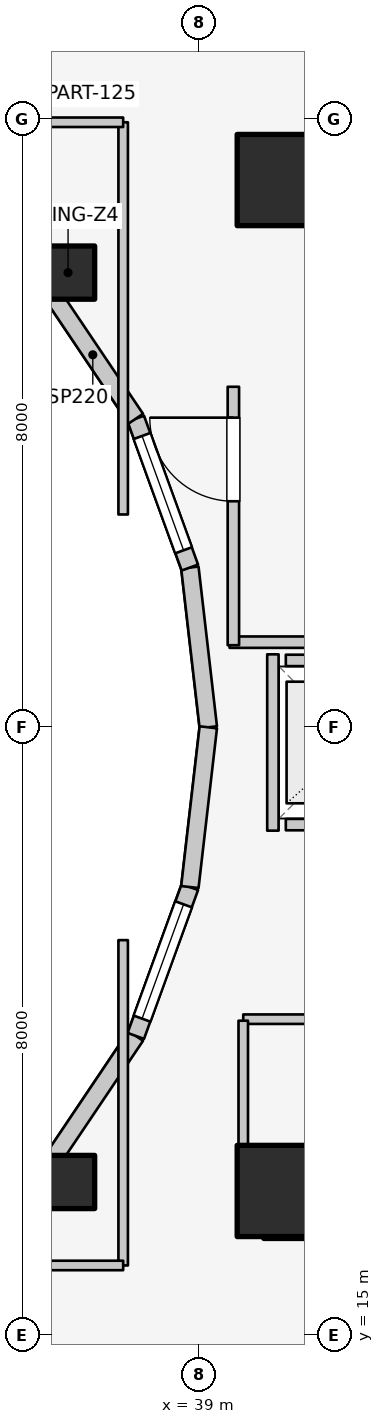
"""IFC4 building model, lengths in metres.
Left out: names, types, materials, properties, quantities, classifications, styles, units other than length and angle.
Written with IfcOpenShell. Run it as: python <this file> out.ifc"""

import sys

from ifc_helpers import new_model, si_unit, direction, frame, frame_2d, origin, origin_2d, place, context, subcontext, project, spatial, rectangle, extrude, element, fill, save


model = new_model("IFC4")
c1 = context("Model", 3, precision=1e-05, world=origin(), true_north=direction((0.0, 1.0)))
c2 = subcontext(c1, "Body", "Model", "MODEL_VIEW")
j1 = project(units=[si_unit("LENGTHUNIT", "METRE"), si_unit("PLANEANGLEUNIT", "RADIAN")], contexts=[c1])
p1 = place(None, origin())
s1 = spatial("IfcSite", under=j1, at=p1, CompositionType="ELEMENT")
p2 = place(p1, origin())
s2 = spatial("IfcBuilding", under=s1, at=p2, CompositionType="ELEMENT")
p3 = place(p2, frame((0.0, 0.0, 204.7)))
s3 = spatial("IfcBuildingStorey", under=s2, at=p3, CompositionType="ELEMENT", Elevation=204.7)
for number, where, z_axis, x_axis in (
    (1, (39.85, 16.55, 0.0), (0.0, 0.0, 1.0), (1.0, 0.0, 0.0)),
    (2, (39.85, 30.35, 0.0), (0.0, 0.0, 1.0), (1.0, 0.0, 0.0)),
):
    element("IfcWall", number, at=place(p3, frame(where, z_axis=z_axis, x_axis=x_axis)), inside=s3, PredefinedType="SHEAR", context=c2, shape_type="SweptSolid", body=[
        extrude(rectangle(XDim=4.5, YDim=0.55, at=frame_2d((2.25, 0.0))), origin(), (0.0, 0.0, 1.0), 3.1),
    ])
for number, where, z_axis, x_axis in (
    (3, (40.1, 16.9, 0.0), (0.0, 0.0, 1.0), (1.0, 0.0, 0.0)),
    (4, (40.1, 30.2, 0.0), (0.0, 0.0, 1.0), (1.0, 0.0, 0.0)),
):
    element("IfcColumn", number, at=place(p3, frame(where, z_axis=z_axis, x_axis=x_axis)), inside=s3, PredefinedType="COLUMN", context=c2, shape_type="SweptSolid", body=[
        extrude(rectangle(XDim=1.2, YDim=1.2, at=origin_2d()), origin(), (0.0, 0.0, 1.0), 3.1),
    ])
for number, where, z_axis, x_axis in (
    (5, (37.275, 28.982, 0.0), (0.0, 0.0, 1.0), (1.0, 0.0, 0.0)),
    (6, (37.275, 17.018, 0.0), (0.0, 0.0, 1.0), (1.0, 0.0, 0.0)),
):
    element("IfcColumn", number, at=place(p3, frame(where, z_axis=z_axis, x_axis=x_axis)), inside=s3, PredefinedType="COLUMN", context=c2, shape_type="SweptSolid", body=[
        extrude(rectangle(XDim=0.7, YDim=0.7, at=origin_2d()), origin(), (0.0, 0.0, 1.0), 3.1),
    ])
p4 = place(p3, frame((39.12, 23.0, 0.0), z_axis=(0.0, 0.0, 1.0), x_axis=(-0.114711713601, 0.993398823617, 0.0)))
e7 = element("IfcWall", 7, at=p4, inside=s3, PredefinedType="STANDARD", context=c2, shape_type="SweptSolid", body=[
    extrude(rectangle(XDim=2.115, YDim=0.23, at=frame_2d((1.058, 0.0))), origin(), (0.0, 0.0, 1.0), 2.84),
])
p5 = place(p3, frame((38.877, 25.102, 0.0), z_axis=(0.0, 0.0, 1.0), x_axis=(-0.341423187295, 0.93990968033, 0.0)))
e8 = element("IfcWall", 8, at=p5, inside=s3, PredefinedType="STANDARD", context=c2, shape_type="SweptSolid", body=[
    extrude(rectangle(XDim=2.084, YDim=0.23, at=frame_2d((1.042, 0.0))), origin(), (0.0, 0.0, 1.0), 2.84),
])
p6 = place(p5, frame((0.242, 0.0, 0.85)))
e9 = element("IfcOpeningElement", 9, at=p6, cuts=e8, PredefinedType="OPENING", context=c2, shape_type="SweptSolid", body=[
    extrude(rectangle(XDim=1.6, YDim=1.65, at=frame_2d((0.8, 0.825))), frame((0.0, 0.125, 0.0), z_axis=(0.0, -1.0, 0.0), x_axis=(1.0, 0.0, 0.0)), (0.0, 0.0, 1.0), 0.25),
])
p7 = place(p3, frame((38.166, 27.06, 0.0), z_axis=(0.0, 0.0, 1.0), x_axis=(-0.558197800898, 0.829707909492, 0.0)))
e10 = element("IfcWall", 10, at=p7, inside=s3, PredefinedType="STANDARD", context=c2, shape_type="SweptSolid", body=[
    extrude(rectangle(XDim=2.027, YDim=0.23, at=frame_2d((1.013, 0.0))), origin(), (0.0, 0.0, 1.0), 2.16),
])
for number, where, z_axis, x_axis in (
    (11, (37.035, 28.742, 0.0), (0.0, 0.0, 1.0), (-0.753, 0.659, 0.0)),
    (12, (35.56, 15.968, 0.0), (0.0, 0.0, 1.0), (0.753, 0.659, 0.0)),
):
    element("IfcWall", number, at=place(p3, frame(where, z_axis=z_axis, x_axis=x_axis)), inside=s3, PredefinedType="STANDARD", context=c2, shape_type="SweptSolid", body=[
        extrude(rectangle(XDim=1.959, YDim=0.23, at=frame_2d((0.98, 0.0))), origin(), (0.0, 0.0, 1.0), 2.16),
    ])
p8 = place(p3, frame((37.035, 17.258, 0.0), z_axis=(0.0, 0.0, 1.0), x_axis=(0.558197800898, 0.829707909492, 0.0)))
e13 = element("IfcWall", 13, at=p8, inside=s3, PredefinedType="STANDARD", context=c2, shape_type="SweptSolid", body=[
    extrude(rectangle(XDim=2.027, YDim=0.23, at=frame_2d((1.013, 0.0))), origin(), (0.0, 0.0, 1.0), 2.16),
])
p9 = place(p3, frame((38.166, 18.94, 0.0), z_axis=(0.0, 0.0, 1.0), x_axis=(0.341423187295, 0.93990968033, 0.0)))
e14 = element("IfcWall", 14, at=p9, inside=s3, PredefinedType="STANDARD", context=c2, shape_type="SweptSolid", body=[
    extrude(rectangle(XDim=2.084, YDim=0.23, at=frame_2d((1.042, 0.0))), origin(), (0.0, 0.0, 1.0), 2.84),
])
p10 = place(p9, frame((0.242, 0.0, 0.85)))
e15 = element("IfcOpeningElement", 15, at=p10, cuts=e14, PredefinedType="OPENING", context=c2, shape_type="SweptSolid", body=[
    extrude(rectangle(XDim=1.6, YDim=1.65, at=frame_2d((0.8, 0.825))), frame((0.0, 0.125, 0.0), z_axis=(0.0, -1.0, 0.0), x_axis=(1.0, 0.0, 0.0)), (0.0, 0.0, 1.0), 0.25),
])
p11 = place(p3, frame((38.877, 20.898, 0.0), z_axis=(0.0, 0.0, 1.0), x_axis=(0.114711713601, 0.993398823617, 0.0)))
e16 = element("IfcWall", 16, at=p11, inside=s3, PredefinedType="STANDARD", context=c2, shape_type="SweptSolid", body=[
    extrude(rectangle(XDim=2.115, YDim=0.23, at=frame_2d((1.058, 0.0))), origin(), (0.0, 0.0, 1.0), 2.84),
])
p12 = place(p3, frame((40.14, 21.72, 0.0), z_axis=(0.0, 0.0, 1.0), x_axis=(1.0, 0.0, 0.0)))
e17 = element("IfcWall", 17, at=p12, inside=s3, PredefinedType="SOLIDWALL", context=c2, shape_type="SweptSolid", body=[
    extrude(rectangle(XDim=1.82, YDim=0.15, at=frame_2d((0.91, 0.0))), origin(), (0.0, 0.0, 1.0), 2.12),
])
p13 = place(p12, frame((0.36, 0.0, 0.0)))
e18 = element("IfcOpeningElement", 18, at=p13, cuts=e17, PredefinedType="OPENING", context=c2, shape_type="SweptSolid", body=[
    extrude(rectangle(XDim=1.1, YDim=2.1, at=frame_2d((0.55, 1.05))), frame((0.0, 0.085, 0.0), z_axis=(0.0, -1.0, 0.0), x_axis=(1.0, 0.0, 0.0)), (0.0, 0.0, 1.0), 0.17),
])
p14 = place(p3, frame((40.14, 23.88, 0.0), z_axis=(0.0, 0.0, 1.0), x_axis=(1.0, 0.0, 0.0)))
e19 = element("IfcWall", 19, at=p14, inside=s3, PredefinedType="SOLIDWALL", context=c2, shape_type="SweptSolid", body=[
    extrude(rectangle(XDim=1.82, YDim=0.15, at=frame_2d((0.91, 0.0))), origin(), (0.0, 0.0, 1.0), 2.12),
])
p15 = place(p3, frame((39.97, 21.64, 0.0), z_axis=(0.0, 0.0, 1.0), x_axis=(0.0, 1.0, 0.0)))
e20 = element("IfcWall", 20, at=p15, inside=s3, PredefinedType="SOLIDWALL", context=c2, shape_type="SweptSolid", body=[
    extrude(rectangle(XDim=2.32, YDim=0.15, at=frame_2d((1.16, 0.0))), origin(), (0.0, 0.0, 1.0), 2.12),
])
p16 = place(p3, frame((39.4, 24.12, 0.0), z_axis=(0.0, 0.0, 1.0), x_axis=(1.0, 0.0, 0.0)))
e21 = element("IfcWall", 21, at=p16, inside=s3, PredefinedType="PARTITIONING", context=c2, shape_type="SweptSolid", body=[
    extrude(rectangle(XDim=5.08, YDim=0.15, at=frame_2d((2.54, 0.0))), origin(), (0.0, 0.0, 1.0), 2.12),
])
p17 = place(p3, frame((39.45, 24.08, 0.0), z_axis=(0.0, 0.0, 1.0), x_axis=(0.0, 1.0, 0.0)))
e22 = element("IfcWall", 22, at=p17, inside=s3, PredefinedType="PARTITIONING", context=c2, shape_type="SweptSolid", body=[
    extrude(rectangle(XDim=3.4, YDim=0.15, at=frame_2d((1.7, 0.0))), origin(), (0.0, 0.0, 1.0), 2.855),
])
p18 = place(p17, frame((1.894, 0.0, 0.0)))
e23 = element("IfcOpeningElement", 23, at=p18, cuts=e22, PredefinedType="OPENING", context=c2, shape_type="SweptSolid", body=[
    extrude(rectangle(XDim=1.1, YDim=2.1, at=frame_2d((0.55, 1.05))), frame((0.0, 0.085, 0.0), z_axis=(0.0, -1.0, 0.0), x_axis=(1.0, 0.0, 0.0)), (0.0, 0.0, 1.0), 0.17),
])
p19 = place(p3, frame((39.58, 19.16, 0.0), z_axis=(0.0, 0.0, 1.0), x_axis=(1.0, 0.0, 0.0)))
e24 = element("IfcWall", 24, at=p19, inside=s3, PredefinedType="PARTITIONING", context=c2, shape_type="SweptSolid", body=[
    extrude(rectangle(XDim=4.87, YDim=0.125, at=frame_2d((2.435, 0.0))), origin(), (0.0, 0.0, 1.0), 2.12),
])
p20 = place(p19, frame((1.748, 0.0, 0.0)))
e25 = element("IfcOpeningElement", 25, at=p20, cuts=e24, PredefinedType="OPENING", context=c2, shape_type="SweptSolid", body=[
    extrude(rectangle(XDim=0.85, YDim=2.05, at=frame_2d((0.425, 1.025))), frame((0.0, 0.073, 0.0), z_axis=(0.0, -1.0, 0.0), x_axis=(1.0, 0.0, 0.0)), (0.0, 0.0, 1.0), 0.145),
])
p21 = place(p3, frame((39.58, 17.1, 0.0), z_axis=(0.0, 0.0, 1.0), x_axis=(0.0, 1.0, 0.0)))
e26 = element("IfcWall", 26, at=p21, inside=s3, PredefinedType="PARTITIONING", context=c2, shape_type="SweptSolid", body=[
    extrude(rectangle(XDim=2.04, YDim=0.125, at=frame_2d((1.02, 0.0))), origin(), (0.0, 0.0, 1.0), 2.232),
])
p22 = place(p3, frame((35.55, 30.015, 0.0), z_axis=(0.0, 0.0, 1.0), x_axis=(0.523992004803, 0.851723182086, 0.0)))
e27 = element("IfcWall", 27, at=p22, inside=s3, PredefinedType="PARTITIONING", context=c2, shape_type="SweptSolid", body=[
    extrude(rectangle(XDim=3.101, YDim=0.125, at=frame_2d((1.551, 0.0))), origin(), (0.0, 0.0, 1.0), 2.376),
])
p23 = place(p3, frame((38.0, 25.8, 0.0), z_axis=(0.0, 0.0, 1.0), x_axis=(0.0, 1.0, 0.0)))
e28 = element("IfcWall", 28, at=p23, inside=s3, PredefinedType="PARTITIONING", context=c2, shape_type="SweptSolid", body=[
    extrude(rectangle(XDim=5.16, YDim=0.125, at=frame_2d((2.58, 0.0))), origin(), (0.0, 0.0, 1.0), 2.232),
])
p24 = place(p3, frame((35.4, 30.96, 0.0), z_axis=(0.0, 0.0, 1.0), x_axis=(1.0, 0.0, 0.0)))
e29 = element("IfcWall", 29, at=p24, inside=s3, PredefinedType="PARTITIONING", context=c2, shape_type="SweptSolid", body=[
    extrude(rectangle(XDim=2.6, YDim=0.125, at=frame_2d((1.3, 0.0))), origin(), (0.0, 0.0, 1.0), 2.376),
])
p25 = place(p3, frame((38.0, 15.92, 0.0), z_axis=(0.0, 0.0, 1.0), x_axis=(0.0, 1.0, 0.0)))
e30 = element("IfcWall", 30, at=p25, inside=s3, PredefinedType="PARTITIONING", context=c2, shape_type="SweptSolid", body=[
    extrude(rectangle(XDim=4.28, YDim=0.125, at=frame_2d((2.14, 0.0))), origin(), (0.0, 0.0, 1.0), 2.232),
])
p26 = place(p3, frame((35.4, 15.92, 0.0), z_axis=(0.0, 0.0, 1.0), x_axis=(1.0, 0.0, 0.0)))
e31 = element("IfcWall", 31, at=p26, inside=s3, PredefinedType="PARTITIONING", context=c2, shape_type="SweptSolid", body=[
    extrude(rectangle(XDim=2.6, YDim=0.125, at=frame_2d((1.3, 0.0))), origin(), (0.0, 0.0, 1.0), 2.232),
])
p27 = place(p6, origin())
e32 = element("IfcWindow", 32, at=p27, inside=s3, PartitioningType="SINGLE_PANEL", PredefinedType="WINDOW", context=c2, shape_type="SweptSolid", body=[
    extrude(rectangle(XDim=1.6, YDim=1.65, at=frame_2d((0.8, 0.825))), frame((0.0, 0.03, 0.0), z_axis=(0.0, -1.0, 0.0), x_axis=(1.0, 0.0, 0.0)), (0.0, 0.0, 1.0), 0.06),
])
fill(e9, e32)
p28 = place(p10, origin())
e33 = element("IfcWindow", 33, at=p28, inside=s3, PartitioningType="SINGLE_PANEL", PredefinedType="WINDOW", context=c2, shape_type="SweptSolid", body=[
    extrude(rectangle(XDim=1.6, YDim=1.65, at=frame_2d((0.8, 0.825))), frame((0.0, 0.03, 0.0), z_axis=(0.0, -1.0, 0.0), x_axis=(1.0, 0.0, 0.0)), (0.0, 0.0, 1.0), 0.06),
])
fill(e15, e33)
p29 = place(p18, origin())
e34 = element("IfcDoor", 34, at=p29, inside=s3, OperationType="SINGLE_SWING_RIGHT", PredefinedType="DOOR", context=c2, shape_type="SweptSolid", body=[
    extrude(rectangle(XDim=1.1, YDim=2.1, at=frame_2d((0.55, 1.05))), frame((0.0, 0.025, 0.0), z_axis=(0.0, -1.0, 0.0), x_axis=(1.0, 0.0, 0.0)), (0.0, 0.0, 1.0), 0.05),
])
fill(e23, e34)
save(model, sys.argv[1])
